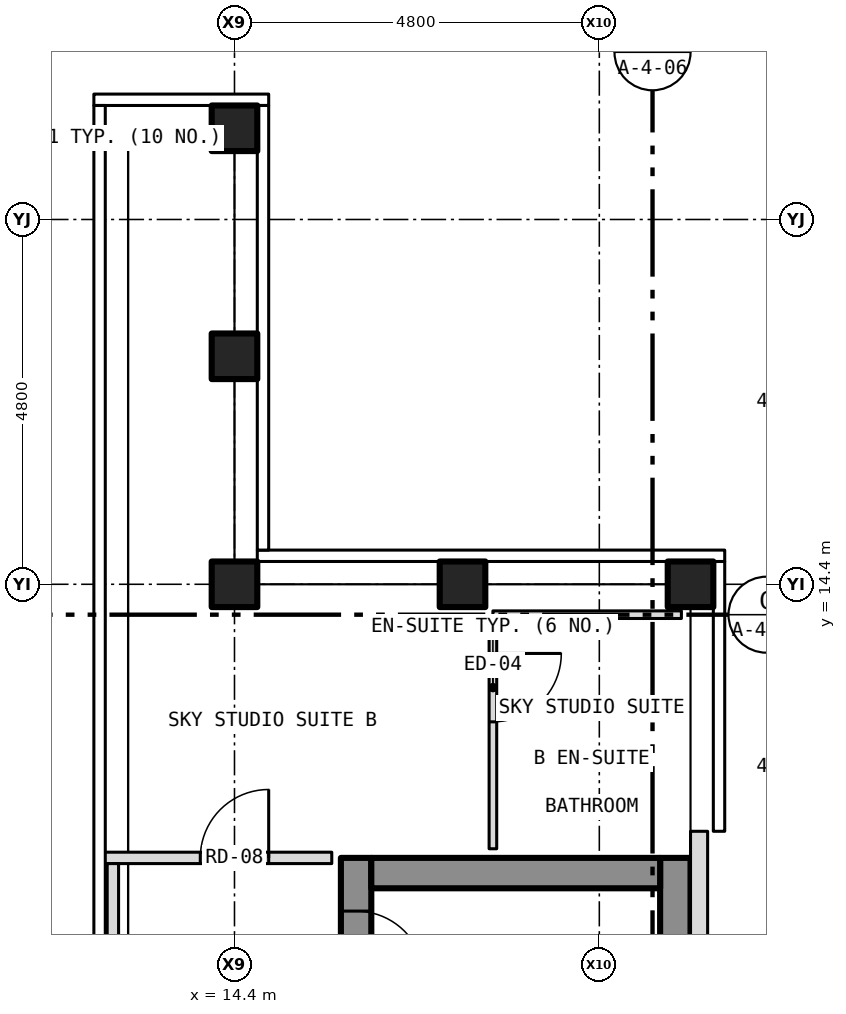
"""IFC4 building model, lengths in metres.
Left out: names, types, materials, properties, quantities, classifications, styles, units other than length and angle.
Written with IfcOpenShell. Run it as: python <this file> out.ifc"""

import sys

from ifc_helpers import new_model, si_unit, direction, frame, frame_2d, origin, origin_2d, place, context, subcontext, project, spatial, rectangle, hollow_rectangle, extrude, element, fill, save


model = new_model("IFC4")
c1 = context("Model", 3, precision=1e-05, world=origin(), true_north=direction((0.0, 1.0)))
c2 = subcontext(c1, "Body", "Model", "MODEL_VIEW")
j1 = project(units=[si_unit("LENGTHUNIT", "METRE"), si_unit("PLANEANGLEUNIT", "RADIAN")], contexts=[c1])
p1 = place(None, origin())
s1 = spatial("IfcSite", under=j1, at=p1, CompositionType="ELEMENT")
p2 = place(p1, origin())
s2 = spatial("IfcBuilding", under=s1, at=p2, CompositionType="ELEMENT")
p3 = place(p2, frame((0.0, 0.0, 286.5)))
s3 = spatial("IfcBuildingStorey", under=s2, at=p3, CompositionType="ELEMENT", Elevation=286.5)
for number, where, z_axis, x_axis in (
    (1, (14.4, 20.4, -0.15), (0.0, 0.0, 1.0), (1.0, 0.0, 0.0)),
    (2, (20.4, 14.4, -0.15), (0.0, 0.0, 1.0), (1.0, 0.0, 0.0)),
    (3, (14.4, 14.4, -0.15), (0.0, 0.0, 1.0), (1.0, 0.0, 0.0)),
    (4, (14.4, 17.4, -0.15), (0.0, 0.0, 1.0), (1.0, 0.0, 0.0)),
    (5, (17.4, 14.4, -0.15), (0.0, 0.0, 1.0), (1.0, 0.0, 0.0)),
):
    element("IfcColumn", number, at=place(p3, frame(where, z_axis=z_axis, x_axis=x_axis)), inside=s3, PredefinedType="COLUMN", context=c2, shape_type="SweptSolid", body=[
        extrude(hollow_rectangle(XDim=0.6, YDim=0.6, WallThickness=0.03, at=origin_2d()), origin(), (0.0, 0.0, 1.0), 3.45),
    ])
p4 = place(p3, frame((16.0, -10.8, 0.0), z_axis=(0.0, 0.0, 1.0), x_axis=(0.0, 1.0, 0.0)))
e6 = element("IfcWall", 6, at=p4, inside=s3, PredefinedType="SHEAR", context=c2, shape_type="SweptSolid", body=[
    extrude(rectangle(XDim=21.6, YDim=0.4, at=frame_2d((10.8, 0.0))), origin(), (0.0, 0.0, 1.0), 3.25),
])
p5 = place(p4, frame((9.4, 0.0, 0.0)))
e7 = element("IfcOpeningElement", 7, at=p5, cuts=e6, PredefinedType="OPENING", context=c2, shape_type="SweptSolid", body=[
    extrude(rectangle(XDim=1.1, YDim=2.1, at=frame_2d((0.55, 1.05))), frame((0.0, 0.212, 0.0), z_axis=(0.0, -1.0, 0.0), x_axis=(1.0, 0.0, 0.0)), (0.0, 0.0, 1.0), 0.424),
])
p6 = place(p4, frame((11.5, 0.0, 0.0)))
e8 = element("IfcOpeningElement", 8, at=p6, cuts=e6, PredefinedType="OPENING", context=c2, shape_type="SweptSolid", body=[
    extrude(rectangle(XDim=1.1, YDim=2.1, at=frame_2d((0.55, 1.05))), frame((0.0, 0.212, 0.0), z_axis=(0.0, -1.0, 0.0), x_axis=(1.0, 0.0, 0.0)), (0.0, 0.0, 1.0), 0.424),
])
p7 = place(p4, frame((13.6, 0.0, 0.0)))
e9 = element("IfcOpeningElement", 9, at=p7, cuts=e6, PredefinedType="OPENING", context=c2, shape_type="SweptSolid", body=[
    extrude(rectangle(XDim=1.1, YDim=2.1, at=frame_2d((0.55, 1.05))), frame((0.0, 0.212, 0.0), z_axis=(0.0, -1.0, 0.0), x_axis=(1.0, 0.0, 0.0)), (0.0, 0.0, 1.0), 0.424),
])
p8 = place(p4, frame((15.7, 0.0, 0.0)))
e10 = element("IfcOpeningElement", 10, at=p8, cuts=e6, PredefinedType="OPENING", context=c2, shape_type="SweptSolid", body=[
    extrude(rectangle(XDim=1.1, YDim=2.1, at=frame_2d((0.55, 1.05))), frame((0.0, 0.212, 0.0), z_axis=(0.0, -1.0, 0.0), x_axis=(1.0, 0.0, 0.0)), (0.0, 0.0, 1.0), 0.424),
])
p9 = place(p4, frame((17.8, 0.0, 0.0)))
e11 = element("IfcOpeningElement", 11, at=p9, cuts=e6, PredefinedType="OPENING", context=c2, shape_type="SweptSolid", body=[
    extrude(rectangle(XDim=1.1, YDim=2.1, at=frame_2d((0.55, 1.05))), frame((0.0, 0.212, 0.0), z_axis=(0.0, -1.0, 0.0), x_axis=(1.0, 0.0, 0.0)), (0.0, 0.0, 1.0), 0.424),
])
p10 = place(p4, frame((5.642, 0.0, 0.0)))
e12 = element("IfcOpeningElement", 12, at=p10, cuts=e6, PredefinedType="OPENING", context=c2, shape_type="SweptSolid", body=[
    extrude(rectangle(XDim=1.1, YDim=2.1, at=frame_2d((0.55, 1.05))), frame((0.0, 0.212, 0.0), z_axis=(0.0, -1.0, 0.0), x_axis=(1.0, 0.0, 0.0)), (0.0, 0.0, 1.0), 0.424),
])
p11 = place(p4, frame((7.5, 0.0, 0.0)))
e13 = element("IfcOpeningElement", 13, at=p11, cuts=e6, PredefinedType="OPENING", context=c2, shape_type="SweptSolid", body=[
    extrude(rectangle(XDim=1.1, YDim=2.1, at=frame_2d((0.55, 1.05))), frame((0.0, 0.212, 0.0), z_axis=(0.0, -1.0, 0.0), x_axis=(1.0, 0.0, 0.0)), (0.0, 0.0, 1.0), 0.424),
])
p12 = place(p4, frame((20.0, 0.0, 0.0)))
e14 = element("IfcOpeningElement", 14, at=p12, cuts=e6, PredefinedType="OPENING", context=c2, shape_type="SweptSolid", body=[
    extrude(rectangle(XDim=0.9, YDim=2.1, at=frame_2d((0.45, 1.05))), frame((0.0, 0.212, 0.0), z_axis=(0.0, -1.0, 0.0), x_axis=(1.0, 0.0, 0.0)), (0.0, 0.0, 1.0), 0.424),
])
p13 = place(p3, frame((20.2, -10.8, 0.0), z_axis=(0.0, 0.0, 1.0), x_axis=(0.0, 1.0, 0.0)))
e15 = element("IfcWall", 15, at=p13, inside=s3, PredefinedType="SHEAR", context=c2, shape_type="SweptSolid", body=[
    extrude(rectangle(XDim=21.6, YDim=0.4, at=frame_2d((10.8, 0.0))), origin(), (0.0, 0.0, 1.0), 3.25),
])
p14 = place(p3, frame((16.2, 10.6, 0.0), z_axis=(0.0, 0.0, 1.0), x_axis=(1.0, 0.0, 0.0)))
e16 = element("IfcWall", 16, at=p14, inside=s3, PredefinedType="SHEAR", context=c2, shape_type="SweptSolid", body=[
    extrude(rectangle(XDim=3.8, YDim=0.4, at=frame_2d((1.9, 0.0))), origin(), (0.0, 0.0, 1.0), 3.25),
])
p15 = place(p3, frame((20.512, -11.15, 0.0), z_axis=(0.0, 0.0, 1.0), x_axis=(0.0, 1.0, 0.0)))
e17 = element("IfcWall", 17, at=p15, inside=s3, PredefinedType="SOLIDWALL", context=c2, shape_type="SweptSolid", body=[
    extrude(rectangle(XDim=22.3, YDim=0.225, at=frame_2d((11.15, 0.0))), origin(), (0.0, 0.0, 1.0), 3.5),
])
p16 = place(p15, frame((3.3, 0.0, 1.0)))
e18 = element("IfcOpeningElement", 18, at=p16, cuts=e17, PredefinedType="OPENING", context=c2, shape_type="SweptSolid", body=[
    extrude(rectangle(XDim=0.6, YDim=1.5, at=frame_2d((0.3, 0.75))), frame((0.0, 0.125, 0.0), z_axis=(0.0, -1.0, 0.0), x_axis=(1.0, 0.0, 0.0)), (0.0, 0.0, 1.0), 0.249),
])
p17 = place(p3, frame((13.0, 20.275, 0.0), z_axis=(0.0, 0.0, 1.0), x_axis=(-1.0, 0.0, 0.0)))
e19 = element("IfcWall", 19, at=p17, inside=s3, PredefinedType="PARAPET", context=c2, shape_type="SweptSolid", body=[
    extrude(rectangle(XDim=0.3, YDim=0.25, at=frame_2d((0.15, 0.0))), origin(), (0.0, 0.0, 1.0), 1.1),
])
p18 = place(p3, frame((12.55, 20.275, 0.0), z_axis=(0.0, 0.0, 1.0), x_axis=(-1.0, 0.0, 0.0)))
e20 = element("IfcWall", 20, at=p18, inside=s3, PredefinedType="PARAPET", context=c2, shape_type="SweptSolid", body=[
    extrude(rectangle(XDim=2.024, YDim=0.25, at=frame_2d((1.012, 0.0))), origin(), (0.0, 0.0, 1.0), 1.1),
])
p19 = place(p3, frame((12.67, 10.8, 0.0), z_axis=(0.0, 0.0, 1.0), x_axis=(1.0, 0.0, 0.0)))
e21 = element("IfcWall", 21, at=p19, inside=s3, PredefinedType="PARTITIONING", context=c2, shape_type="SweptSolid", body=[
    extrude(rectangle(XDim=3.01, YDim=0.15, at=frame_2d((1.505, 0.0))), origin(), (0.0, 0.0, 1.0), 3.3),
])
p20 = place(p19, frame((1.28, 0.0, 0.0)))
e22 = element("IfcOpeningElement", 22, at=p20, cuts=e21, PredefinedType="OPENING", context=c2, shape_type="SweptSolid", body=[
    extrude(rectangle(XDim=0.9, YDim=2.1, at=frame_2d((0.45, 1.05))), frame((0.0, 0.087, 0.0), z_axis=(0.0, -1.0, 0.0), x_axis=(1.0, 0.0, 0.0)), (0.0, 0.0, 1.0), 0.174),
])
p21 = place(p3, frame((17.8, 14.0, 0.0), z_axis=(0.0, 0.0, 1.0), x_axis=(1.0, 0.0, 0.0)))
e23 = element("IfcWall", 23, at=p21, inside=s3, PredefinedType="PARTITIONING", context=c2, shape_type="SweptSolid", body=[
    extrude(rectangle(XDim=2.48, YDim=0.1, at=frame_2d((1.24, 0.0))), origin(), (0.0, 0.0, 1.0), 3.3),
])
p22 = place(p3, frame((12.8, 2.4, 0.0), z_axis=(0.0, 0.0, 1.0), x_axis=(0.0, 1.0, 0.0)))
e24 = element("IfcWall", 24, at=p22, inside=s3, PredefinedType="PARTITIONING", context=c2, shape_type="SweptSolid", body=[
    extrude(rectangle(XDim=8.325, YDim=0.15, at=frame_2d((4.163, 0.0))), origin(), (0.0, 0.0, 1.0), 3.3),
])
p23 = place(p3, frame((17.8, 10.92, 0.0), z_axis=(0.0, 0.0, 1.0), x_axis=(0.0, 1.0, 0.0)))
e25 = element("IfcWall", 25, at=p23, inside=s3, PredefinedType="PARTITIONING", context=c2, shape_type="SweptSolid", body=[
    extrude(rectangle(XDim=3.03, YDim=0.1, at=frame_2d((1.515, 0.0))), origin(), (0.0, 0.0, 1.0), 3.3),
])
p24 = place(p23, frame((1.67, 0.0, 0.0)))
e26 = element("IfcOpeningElement", 26, at=p24, cuts=e25, PredefinedType="OPENING", context=c2, shape_type="SweptSolid", body=[
    extrude(rectangle(XDim=0.9, YDim=2.1, at=frame_2d((0.45, 1.05))), frame((0.0, 0.062, 0.0), z_axis=(0.0, -1.0, 0.0), x_axis=(1.0, 0.0, 0.0)), (0.0, 0.0, 1.0), 0.124),
])
p25 = place(p12, origin())
e27 = element("IfcDoor", 27, at=p25, inside=s3, OperationType="SINGLE_SWING_LEFT", PredefinedType="DOOR", context=c2, shape_type="SweptSolid", body=[
    extrude(rectangle(XDim=0.9, YDim=2.1, at=frame_2d((0.45, 1.05))), frame((0.0, 0.025, 0.0), z_axis=(0.0, -1.0, 0.0), x_axis=(1.0, 0.0, 0.0)), (0.0, 0.0, 1.0), 0.05),
])
fill(e14, e27)
p26 = place(p20, origin())
e28 = element("IfcDoor", 28, at=p26, inside=s3, OperationType="SINGLE_SWING_RIGHT", PredefinedType="DOOR", context=c2, shape_type="SweptSolid", body=[
    extrude(rectangle(XDim=0.9, YDim=2.1, at=frame_2d((0.45, 1.05))), frame((0.0, 0.025, 0.0), z_axis=(0.0, -1.0, 0.0), x_axis=(1.0, 0.0, 0.0)), (0.0, 0.0, 1.0), 0.05),
])
fill(e22, e28)
p27 = place(p24, origin())
e29 = element("IfcDoor", 29, at=p27, inside=s3, OperationType="SINGLE_SWING_RIGHT", PredefinedType="DOOR", context=c2, shape_type="SweptSolid", body=[
    extrude(rectangle(XDim=0.9, YDim=2.1, at=frame_2d((0.45, 1.05))), frame((0.0, 0.025, 0.0), z_axis=(0.0, -1.0, 0.0), x_axis=(1.0, 0.0, 0.0)), (0.0, 0.0, 1.0), 0.05),
])
fill(e26, e29)
save(model, sys.argv[1])
